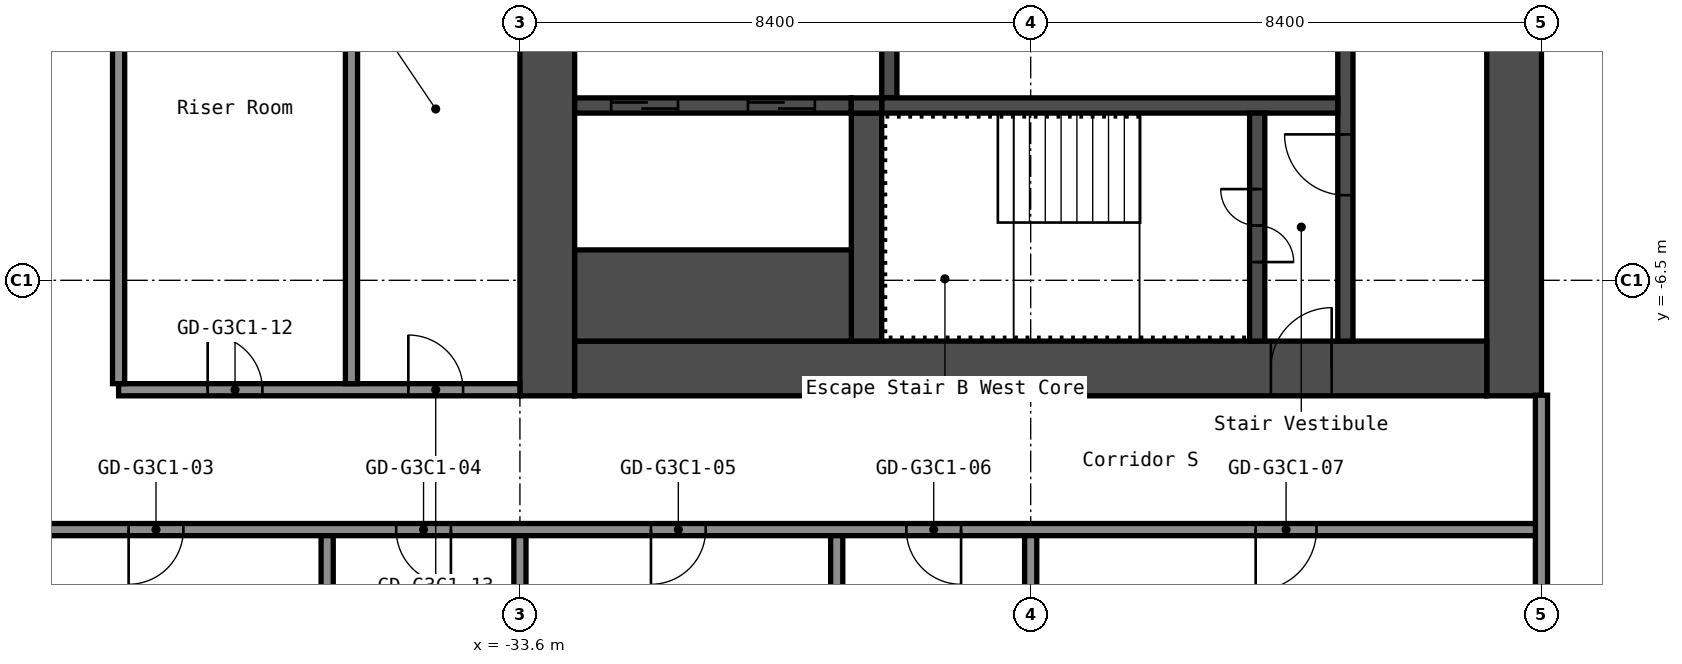
"""IFC4 building model, lengths in metres.
Left out: names, types, materials, properties, quantities, classifications, styles, units other than length and angle.
Written with IfcOpenShell. Run it as: python <this file> out.ifc"""

import sys

from ifc_helpers import new_model, si_unit, direction, frame, frame_2d, origin, place, context, subcontext, project, spatial, rectangle, extrude, element, fill, save


model = new_model("IFC4")
c1 = context("Model", 3, precision=1e-05, world=origin(), true_north=direction((0.0, 1.0)))
c2 = subcontext(c1, "Body", "Model", "MODEL_VIEW")
j1 = project(units=[si_unit("LENGTHUNIT", "METRE"), si_unit("PLANEANGLEUNIT", "RADIAN")], contexts=[c1])
p1 = place(None, origin())
s1 = spatial("IfcSite", under=j1, at=p1, CompositionType="ELEMENT")
p2 = place(p1, origin())
s2 = spatial("IfcBuilding", under=s1, at=p2, CompositionType="ELEMENT")
p3 = place(p2, frame((0.0, 0.0, 153.4)))
s3 = spatial("IfcBuildingStorey", under=s2, at=p3, CompositionType="ELEMENT", Elevation=153.4)
p4 = place(p3, frame((-17.25, -8.4, 0.0), z_axis=(0.0, 0.0, 1.0), x_axis=(0.0, 1.0, 0.0)))
e1 = element("IfcWall", 1, at=p4, inside=s3, PredefinedType="SHEAR", context=c2, shape_type="SweptSolid", body=[
    extrude(rectangle(XDim=16.8, YDim=0.9, at=frame_2d((8.4, 0.0))), origin(), (0.0, 0.0, 1.0), 2.75),
])
p5 = place(p4, frame((7.1, 0.0, 0.0)))
e2 = element("IfcOpeningElement", 2, at=p5, cuts=e1, PredefinedType="OPENING", context=c2, shape_type="SweptSolid", body=[
    extrude(rectangle(XDim=1.6, YDim=2.1, at=frame_2d((0.8, 1.05))), frame((0.0, 0.46, 0.0), z_axis=(0.0, -1.0, 0.0), x_axis=(1.0, 0.0, 0.0)), (0.0, 0.0, 1.0), 0.92),
])
p6 = place(p3, frame((-33.15, -8.4, 0.0), z_axis=(0.0, 0.0, 1.0), x_axis=(0.0, 1.0, 0.0)))
e3 = element("IfcWall", 3, at=p6, inside=s3, PredefinedType="SHEAR", context=c2, shape_type="SweptSolid", body=[
    extrude(rectangle(XDim=16.8, YDim=0.9, at=frame_2d((8.4, 0.0))), origin(), (0.0, 0.0, 1.0), 2.75),
])
p7 = place(p3, frame((-32.7, -7.95, 0.0), z_axis=(0.0, 0.0, 1.0), x_axis=(1.0, 0.0, 0.0)))
e4 = element("IfcWall", 4, at=p7, inside=s3, PredefinedType="SHEAR", context=c2, shape_type="SweptSolid", body=[
    extrude(rectangle(XDim=15.0, YDim=0.9, at=frame_2d((7.5, 0.0))), origin(), (0.0, 0.0, 1.0), 2.75),
])
p8 = place(p7, frame((11.45, 0.0, 0.0)))
e5 = element("IfcOpeningElement", 5, at=p8, cuts=e4, PredefinedType="OPENING", context=c2, shape_type="SweptSolid", body=[
    extrude(rectangle(XDim=1.0, YDim=2.1, at=frame_2d((0.5, 1.05))), frame((0.0, 0.46, 0.0), z_axis=(0.0, -1.0, 0.0), x_axis=(1.0, 0.0, 0.0)), (0.0, 0.0, 1.0), 0.92),
])
p9 = place(p3, frame((-20.025, -7.5, 0.0), z_axis=(0.0, 0.0, 1.0), x_axis=(0.0, 1.0, 0.0)))
e6 = element("IfcWall", 6, at=p9, inside=s3, PredefinedType="SHEAR", context=c2, shape_type="SweptSolid", body=[
    extrude(rectangle(XDim=6.3, YDim=0.25, at=frame_2d((3.15, 0.0))), origin(), (0.0, 0.0, 1.0), 2.75),
])
p10 = place(p9, frame((2.4, 0.0, 0.0)))
e7 = element("IfcOpeningElement", 7, at=p10, cuts=e6, PredefinedType="OPENING", context=c2, shape_type="SweptSolid", body=[
    extrude(rectangle(XDim=1.0, YDim=2.1, at=frame_2d((0.5, 1.05))), frame((0.0, 0.135, 0.0), z_axis=(0.0, -1.0, 0.0), x_axis=(1.0, 0.0, 0.0)), (0.0, 0.0, 1.0), 0.27),
])
p11 = place(p3, frame((-27.525, -3.5, 0.0), z_axis=(0.0, 0.0, 1.0), x_axis=(0.0, 1.0, 0.0)))
e8 = element("IfcWall", 8, at=p11, inside=s3, PredefinedType="SHEAR", context=c2, shape_type="SweptSolid", body=[
    extrude(rectangle(XDim=2.05, YDim=0.25, at=frame_2d((1.025, 0.0))), origin(), (0.0, 0.0, 1.0), 2.75),
])
p12 = place(p3, frame((-27.65, -3.625, 0.0), z_axis=(0.0, 0.0, 1.0), x_axis=(1.0, 0.0, 0.0)))
e9 = element("IfcWall", 9, at=p12, inside=s3, PredefinedType="SHEAR", context=c2, shape_type="SweptSolid", body=[
    extrude(rectangle(XDim=7.5, YDim=0.25, at=frame_2d((3.75, 0.0))), origin(), (0.0, 0.0, 1.0), 2.75),
])
p13 = place(p3, frame((-21.475, -7.5, 0.0), z_axis=(0.0, 0.0, 1.0), x_axis=(0.0, 1.0, 0.0)))
e10 = element("IfcWall", 10, at=p13, inside=s3, PredefinedType="SHEAR", context=c2, shape_type="SweptSolid", body=[
    extrude(rectangle(XDim=3.75, YDim=0.25, at=frame_2d((1.875, 0.0))), origin(), (0.0, 0.0, 1.0), 2.75),
])
p14 = place(p13, frame((1.3, 0.0, 0.0)))
e11 = element("IfcOpeningElement", 11, at=p14, cuts=e10, PredefinedType="OPENING", context=c2, shape_type="SweptSolid", body=[
    extrude(rectangle(XDim=1.2, YDim=2.1, at=frame_2d((0.6, 1.05))), frame((0.0, 0.135, 0.0), z_axis=(0.0, -1.0, 0.0), x_axis=(1.0, 0.0, 0.0)), (0.0, 0.0, 1.0), 0.27),
])
p15 = place(p3, frame((-27.9, -7.5, 0.0), z_axis=(0.0, 0.0, 1.0), x_axis=(0.0, 1.0, 0.0)))
e12 = element("IfcWall", 12, at=p15, inside=s3, PredefinedType="SHEAR", context=c2, shape_type="SweptSolid", body=[
    extrude(rectangle(XDim=3.75, YDim=0.5, at=frame_2d((1.875, 0.0))), origin(), (0.0, 0.0, 1.0), 2.75),
])
p16 = place(p3, frame((-32.7, -3.625, 0.0), z_axis=(0.0, 0.0, 1.0), x_axis=(1.0, 0.0, 0.0)))
e13 = element("IfcWall", 13, at=p16, inside=s3, PredefinedType="SHEAR", context=c2, shape_type="SweptSolid", body=[
    extrude(rectangle(XDim=4.55, YDim=0.25, at=frame_2d((2.275, 0.0))), origin(), (0.0, 0.0, 1.0), 2.75),
])
p17 = place(p16, frame((2.85, 0.0, 0.0)))
e14 = element("IfcOpeningElement", 14, at=p17, cuts=e13, PredefinedType="OPENING", context=c2, shape_type="SweptSolid", body=[
    extrude(rectangle(XDim=1.1, YDim=2.1, at=frame_2d((0.55, 1.05))), frame((0.0, 0.135, 0.0), z_axis=(0.0, -1.0, 0.0), x_axis=(1.0, 0.0, 0.0)), (0.0, 0.0, 1.0), 0.27),
])
p18 = place(p16, frame((0.6, 0.0, 0.0)))
e15 = element("IfcOpeningElement", 15, at=p18, cuts=e13, PredefinedType="OPENING", context=c2, shape_type="SweptSolid", body=[
    extrude(rectangle(XDim=1.1, YDim=2.1, at=frame_2d((0.55, 1.05))), frame((0.0, 0.135, 0.0), z_axis=(0.0, -1.0, 0.0), x_axis=(1.0, 0.0, 0.0)), (0.0, 0.0, 1.0), 0.27),
])
p19 = place(p3, frame((-32.7, -6.75, 0.0), z_axis=(0.0, 0.0, 1.0), x_axis=(1.0, 0.0, 0.0)))
e16 = element("IfcWall", 16, at=p19, inside=s3, PredefinedType="SHEAR", context=c2, shape_type="SweptSolid", body=[
    extrude(rectangle(XDim=4.55, YDim=1.5, at=frame_2d((2.275, 0.0))), origin(), (0.0, 0.0, 1.0), 2.75),
])
p20 = place(p3, frame((-28.15, -3.625, 0.0), z_axis=(0.0, 0.0, 1.0), x_axis=(1.0, 0.0, 0.0)))
e17 = element("IfcWall", 17, at=p20, inside=s3, PredefinedType="SHEAR", context=c2, shape_type="SweptSolid", body=[
    extrude(rectangle(XDim=0.5, YDim=0.25, at=frame_2d((0.25, 0.0))), origin(), (0.0, 0.0, 1.0), 2.75),
])
p21 = place(p3, frame((-42.7, -10.6, 0.0), z_axis=(0.0, 0.0, 1.0), x_axis=(1.0, 0.0, 0.0)))
e18 = element("IfcWall", 18, at=p21, inside=s3, PredefinedType="PARTITIONING", context=c2, shape_type="SweptSolid", body=[
    extrude(rectangle(XDim=25.9, YDim=0.2, at=frame_2d((12.95, 0.0))), origin(), (0.0, 0.0, 1.0), 2.75),
])
p22 = place(p21, frame((2.665, 0.0, 0.0)))
e19 = element("IfcOpeningElement", 19, at=p22, cuts=e18, PredefinedType="OPENING", context=c2, shape_type="SweptSolid", body=[
    extrude(rectangle(XDim=0.9, YDim=2.1, at=frame_2d((0.45, 1.05))), frame((0.0, 0.11, 0.0), z_axis=(0.0, -1.0, 0.0), x_axis=(1.0, 0.0, 0.0)), (0.0, 0.0, 1.0), 0.22),
])
p23 = place(p21, frame((7.065, 0.0, 0.0)))
e20 = element("IfcOpeningElement", 20, at=p23, cuts=e18, PredefinedType="OPENING", context=c2, shape_type="SweptSolid", body=[
    extrude(rectangle(XDim=0.9, YDim=2.1, at=frame_2d((0.45, 1.05))), frame((0.0, 0.11, 0.0), z_axis=(0.0, -1.0, 0.0), x_axis=(1.0, 0.0, 0.0)), (0.0, 0.0, 1.0), 0.22),
])
p24 = place(p21, frame((11.255, 0.0, 0.0)))
e21 = element("IfcOpeningElement", 21, at=p24, cuts=e18, PredefinedType="OPENING", context=c2, shape_type="SweptSolid", body=[
    extrude(rectangle(XDim=0.9, YDim=2.1, at=frame_2d((0.45, 1.05))), frame((0.0, 0.11, 0.0), z_axis=(0.0, -1.0, 0.0), x_axis=(1.0, 0.0, 0.0)), (0.0, 0.0, 1.0), 0.22),
])
p25 = place(p21, frame((15.455, 0.0, 0.0)))
e22 = element("IfcOpeningElement", 22, at=p25, cuts=e18, PredefinedType="OPENING", context=c2, shape_type="SweptSolid", body=[
    extrude(rectangle(XDim=0.9, YDim=2.1, at=frame_2d((0.45, 1.05))), frame((0.0, 0.11, 0.0), z_axis=(0.0, -1.0, 0.0), x_axis=(1.0, 0.0, 0.0)), (0.0, 0.0, 1.0), 0.22),
])
p26 = place(p21, frame((21.2, 0.0, 0.0)))
e23 = element("IfcOpeningElement", 23, at=p26, cuts=e18, PredefinedType="OPENING", context=c2, shape_type="SweptSolid", body=[
    extrude(rectangle(XDim=1.0, YDim=2.1, at=frame_2d((0.5, 1.05))), frame((0.0, 0.11, 0.0), z_axis=(0.0, -1.0, 0.0), x_axis=(1.0, 0.0, 0.0)), (0.0, 0.0, 1.0), 0.22),
])
p27 = place(p3, frame((-40.2, -8.3, 0.0), z_axis=(0.0, 0.0, 1.0), x_axis=(1.0, 0.0, 0.0)))
e24 = element("IfcWall", 24, at=p27, inside=s3, PredefinedType="PARTITIONING", context=c2, shape_type="SweptSolid", body=[
    extrude(rectangle(XDim=6.6, YDim=0.2, at=frame_2d((3.3, 0.0))), origin(), (0.0, 0.0, 1.0), 2.75),
])
p28 = place(p27, frame((1.465, 0.0, 0.0)))
e25 = element("IfcOpeningElement", 25, at=p28, cuts=e24, PredefinedType="OPENING", context=c2, shape_type="SweptSolid", body=[
    extrude(rectangle(XDim=0.9, YDim=2.1, at=frame_2d((0.45, 1.05))), frame((0.0, 0.11, 0.0), z_axis=(0.0, -1.0, 0.0), x_axis=(1.0, 0.0, 0.0)), (0.0, 0.0, 1.0), 0.22),
])
p29 = place(p27, frame((4.765, 0.0, 0.0)))
e26 = element("IfcOpeningElement", 26, at=p29, cuts=e24, PredefinedType="OPENING", context=c2, shape_type="SweptSolid", body=[
    extrude(rectangle(XDim=0.9, YDim=2.1, at=frame_2d((0.45, 1.05))), frame((0.0, 0.11, 0.0), z_axis=(0.0, -1.0, 0.0), x_axis=(1.0, 0.0, 0.0)), (0.0, 0.0, 1.0), 0.22),
])
p30 = place(p3, frame((-40.2, -8.2, 0.0), z_axis=(0.0, 0.0, 1.0), x_axis=(0.0, 1.0, 0.0)))
e27 = element("IfcWall", 27, at=p30, inside=s3, PredefinedType="PARTITIONING", context=c2, shape_type="SweptSolid", body=[
    extrude(rectangle(XDim=16.4, YDim=0.2, at=frame_2d((8.2, 0.0))), origin(), (0.0, 0.0, 1.0), 2.75),
])
p31 = place(p3, frame((-36.77, -19.3, 0.0), z_axis=(0.0, 0.0, 1.0), x_axis=(0.0, 1.0, 0.0)))
e28 = element("IfcWall", 28, at=p31, inside=s3, PredefinedType="PARTITIONING", context=c2, shape_type="SweptSolid", body=[
    extrude(rectangle(XDim=8.6, YDim=0.2, at=frame_2d((4.3, 0.0))), origin(), (0.0, 0.0, 1.0), 2.75),
])
p32 = place(p3, frame((-36.37, -8.2, 0.0), z_axis=(0.0, 0.0, 1.0), x_axis=(0.0, 1.0, 0.0)))
e29 = element("IfcWall", 29, at=p32, inside=s3, PredefinedType="PARTITIONING", context=c2, shape_type="SweptSolid", body=[
    extrude(rectangle(XDim=8.2, YDim=0.2, at=frame_2d((4.1, 0.0))), origin(), (0.0, 0.0, 1.0), 2.75),
])
for number, where, z_axis, x_axis in (
    (30, (-33.6, -19.3, 0.0), (0.0, 0.0, 1.0), (0.0, 1.0, 0.0)),
    (31, (-28.39, -19.3, 0.0), (0.0, 0.0, 1.0), (0.0, 1.0, 0.0)),
    (32, (-25.2, -19.3, 0.0), (0.0, 0.0, 1.0), (0.0, 1.0, 0.0)),
):
    element("IfcWall", number, at=place(p3, frame(where, z_axis=z_axis, x_axis=x_axis)), inside=s3, PredefinedType="PARTITIONING", context=c2, shape_type="SweptSolid", body=[
        extrude(rectangle(XDim=8.6, YDim=0.2, at=frame_2d((4.3, 0.0))), origin(), (0.0, 0.0, 1.0), 2.75),
    ])
p33 = place(p3, frame((-16.8, -19.3, 0.0), z_axis=(0.0, 0.0, 1.0), x_axis=(0.0, 1.0, 0.0)))
e33 = element("IfcWall", 33, at=p33, inside=s3, PredefinedType="PARTITIONING", context=c2, shape_type="SweptSolid", body=[
    extrude(rectangle(XDim=10.91, YDim=0.2, at=frame_2d((5.455, 0.0))), origin(), (0.0, 0.0, 1.0), 2.75),
])
p34 = place(p8, origin())
e34 = element("IfcDoor", 34, at=p34, inside=s3, OperationType="SINGLE_SWING_LEFT", PredefinedType="DOOR", context=c2, shape_type="SweptSolid", body=[
    extrude(rectangle(XDim=1.0, YDim=2.1, at=frame_2d((0.5, 1.05))), frame((0.0, 0.025, 0.0), z_axis=(0.0, -1.0, 0.0), x_axis=(1.0, 0.0, 0.0)), (0.0, 0.0, 1.0), 0.05),
])
fill(e5, e34)
p35 = place(p14, origin())
e35 = element("IfcDoor", 35, at=p35, inside=s3, OperationType="DOUBLE_DOOR_SINGLE_SWING", PredefinedType="DOOR", context=c2, shape_type="SweptSolid", body=[
    extrude(rectangle(XDim=1.2, YDim=2.1, at=frame_2d((0.6, 1.05))), frame((0.0, 0.025, 0.0), z_axis=(0.0, -1.0, 0.0), x_axis=(1.0, 0.0, 0.0)), (0.0, 0.0, 1.0), 0.05),
])
fill(e11, e35)
p36 = place(p10, origin())
e36 = element("IfcDoor", 36, at=p36, inside=s3, OperationType="SINGLE_SWING_LEFT", PredefinedType="DOOR", context=c2, shape_type="SweptSolid", body=[
    extrude(rectangle(XDim=1.0, YDim=2.1, at=frame_2d((0.5, 1.05))), frame((0.0, 0.025, 0.0), z_axis=(0.0, -1.0, 0.0), x_axis=(1.0, 0.0, 0.0)), (0.0, 0.0, 1.0), 0.05),
])
fill(e7, e36)
p37 = place(p17, origin())
e37 = element("IfcDoor", 37, at=p37, inside=s3, OperationType="DOUBLE_DOOR_SLIDING", PredefinedType="DOOR", context=c2, shape_type="SweptSolid", body=[
    extrude(rectangle(XDim=1.1, YDim=2.1, at=frame_2d((0.55, 1.05))), frame((0.0, 0.025, 0.0), z_axis=(0.0, -1.0, 0.0), x_axis=(1.0, 0.0, 0.0)), (0.0, 0.0, 1.0), 0.05),
])
fill(e14, e37)
p38 = place(p18, origin())
e38 = element("IfcDoor", 38, at=p38, inside=s3, OperationType="DOUBLE_DOOR_SLIDING", PredefinedType="DOOR", context=c2, shape_type="SweptSolid", body=[
    extrude(rectangle(XDim=1.1, YDim=2.1, at=frame_2d((0.55, 1.05))), frame((0.0, 0.025, 0.0), z_axis=(0.0, -1.0, 0.0), x_axis=(1.0, 0.0, 0.0)), (0.0, 0.0, 1.0), 0.05),
])
fill(e15, e38)
p39 = place(p22, origin())
e39 = element("IfcDoor", 39, at=p39, inside=s3, OperationType="SINGLE_SWING_LEFT", PredefinedType="DOOR", context=c2, shape_type="SweptSolid", body=[
    extrude(rectangle(XDim=0.9, YDim=2.1, at=frame_2d((0.45, 1.05))), frame((0.0, 0.025, 0.0), z_axis=(0.0, -1.0, 0.0), x_axis=(1.0, 0.0, 0.0)), (0.0, 0.0, 1.0), 0.05),
])
fill(e19, e39)
p40 = place(p23, origin())
e40 = element("IfcDoor", 40, at=p40, inside=s3, OperationType="SINGLE_SWING_RIGHT", PredefinedType="DOOR", context=c2, shape_type="SweptSolid", body=[
    extrude(rectangle(XDim=0.9, YDim=2.1, at=frame_2d((0.45, 1.05))), frame((0.0, 0.025, 0.0), z_axis=(0.0, -1.0, 0.0), x_axis=(1.0, 0.0, 0.0)), (0.0, 0.0, 1.0), 0.05),
])
fill(e20, e40)
p41 = place(p24, origin())
e41 = element("IfcDoor", 41, at=p41, inside=s3, OperationType="SINGLE_SWING_LEFT", PredefinedType="DOOR", context=c2, shape_type="SweptSolid", body=[
    extrude(rectangle(XDim=0.9, YDim=2.1, at=frame_2d((0.45, 1.05))), frame((0.0, 0.025, 0.0), z_axis=(0.0, -1.0, 0.0), x_axis=(1.0, 0.0, 0.0)), (0.0, 0.0, 1.0), 0.05),
])
fill(e21, e41)
p42 = place(p25, origin())
e42 = element("IfcDoor", 42, at=p42, inside=s3, OperationType="SINGLE_SWING_RIGHT", PredefinedType="DOOR", context=c2, shape_type="SweptSolid", body=[
    extrude(rectangle(XDim=0.9, YDim=2.1, at=frame_2d((0.45, 1.05))), frame((0.0, 0.025, 0.0), z_axis=(0.0, -1.0, 0.0), x_axis=(1.0, 0.0, 0.0)), (0.0, 0.0, 1.0), 0.05),
])
fill(e22, e42)
p43 = place(p26, origin())
e43 = element("IfcDoor", 43, at=p43, inside=s3, OperationType="SINGLE_SWING_LEFT", PredefinedType="DOOR", context=c2, shape_type="SweptSolid", body=[
    extrude(rectangle(XDim=1.0, YDim=2.1, at=frame_2d((0.5, 1.05))), frame((0.0, 0.025, 0.0), z_axis=(0.0, -1.0, 0.0), x_axis=(1.0, 0.0, 0.0)), (0.0, 0.0, 1.0), 0.05),
])
fill(e23, e43)
p44 = place(p28, origin())
e44 = element("IfcDoor", 44, at=p44, inside=s3, OperationType="SINGLE_SWING_RIGHT", PredefinedType="DOOR", context=c2, shape_type="SweptSolid", body=[
    extrude(rectangle(XDim=0.9, YDim=2.1, at=frame_2d((0.45, 1.05))), frame((0.0, 0.025, 0.0), z_axis=(0.0, -1.0, 0.0), x_axis=(1.0, 0.0, 0.0)), (0.0, 0.0, 1.0), 0.05),
])
fill(e25, e44)
p45 = place(p29, origin())
e45 = element("IfcDoor", 45, at=p45, inside=s3, OperationType="SINGLE_SWING_RIGHT", PredefinedType="DOOR", context=c2, shape_type="SweptSolid", body=[
    extrude(rectangle(XDim=0.9, YDim=2.1, at=frame_2d((0.45, 1.05))), frame((0.0, 0.025, 0.0), z_axis=(0.0, -1.0, 0.0), x_axis=(1.0, 0.0, 0.0)), (0.0, 0.0, 1.0), 0.05),
])
fill(e26, e45)
save(model, sys.argv[1])
